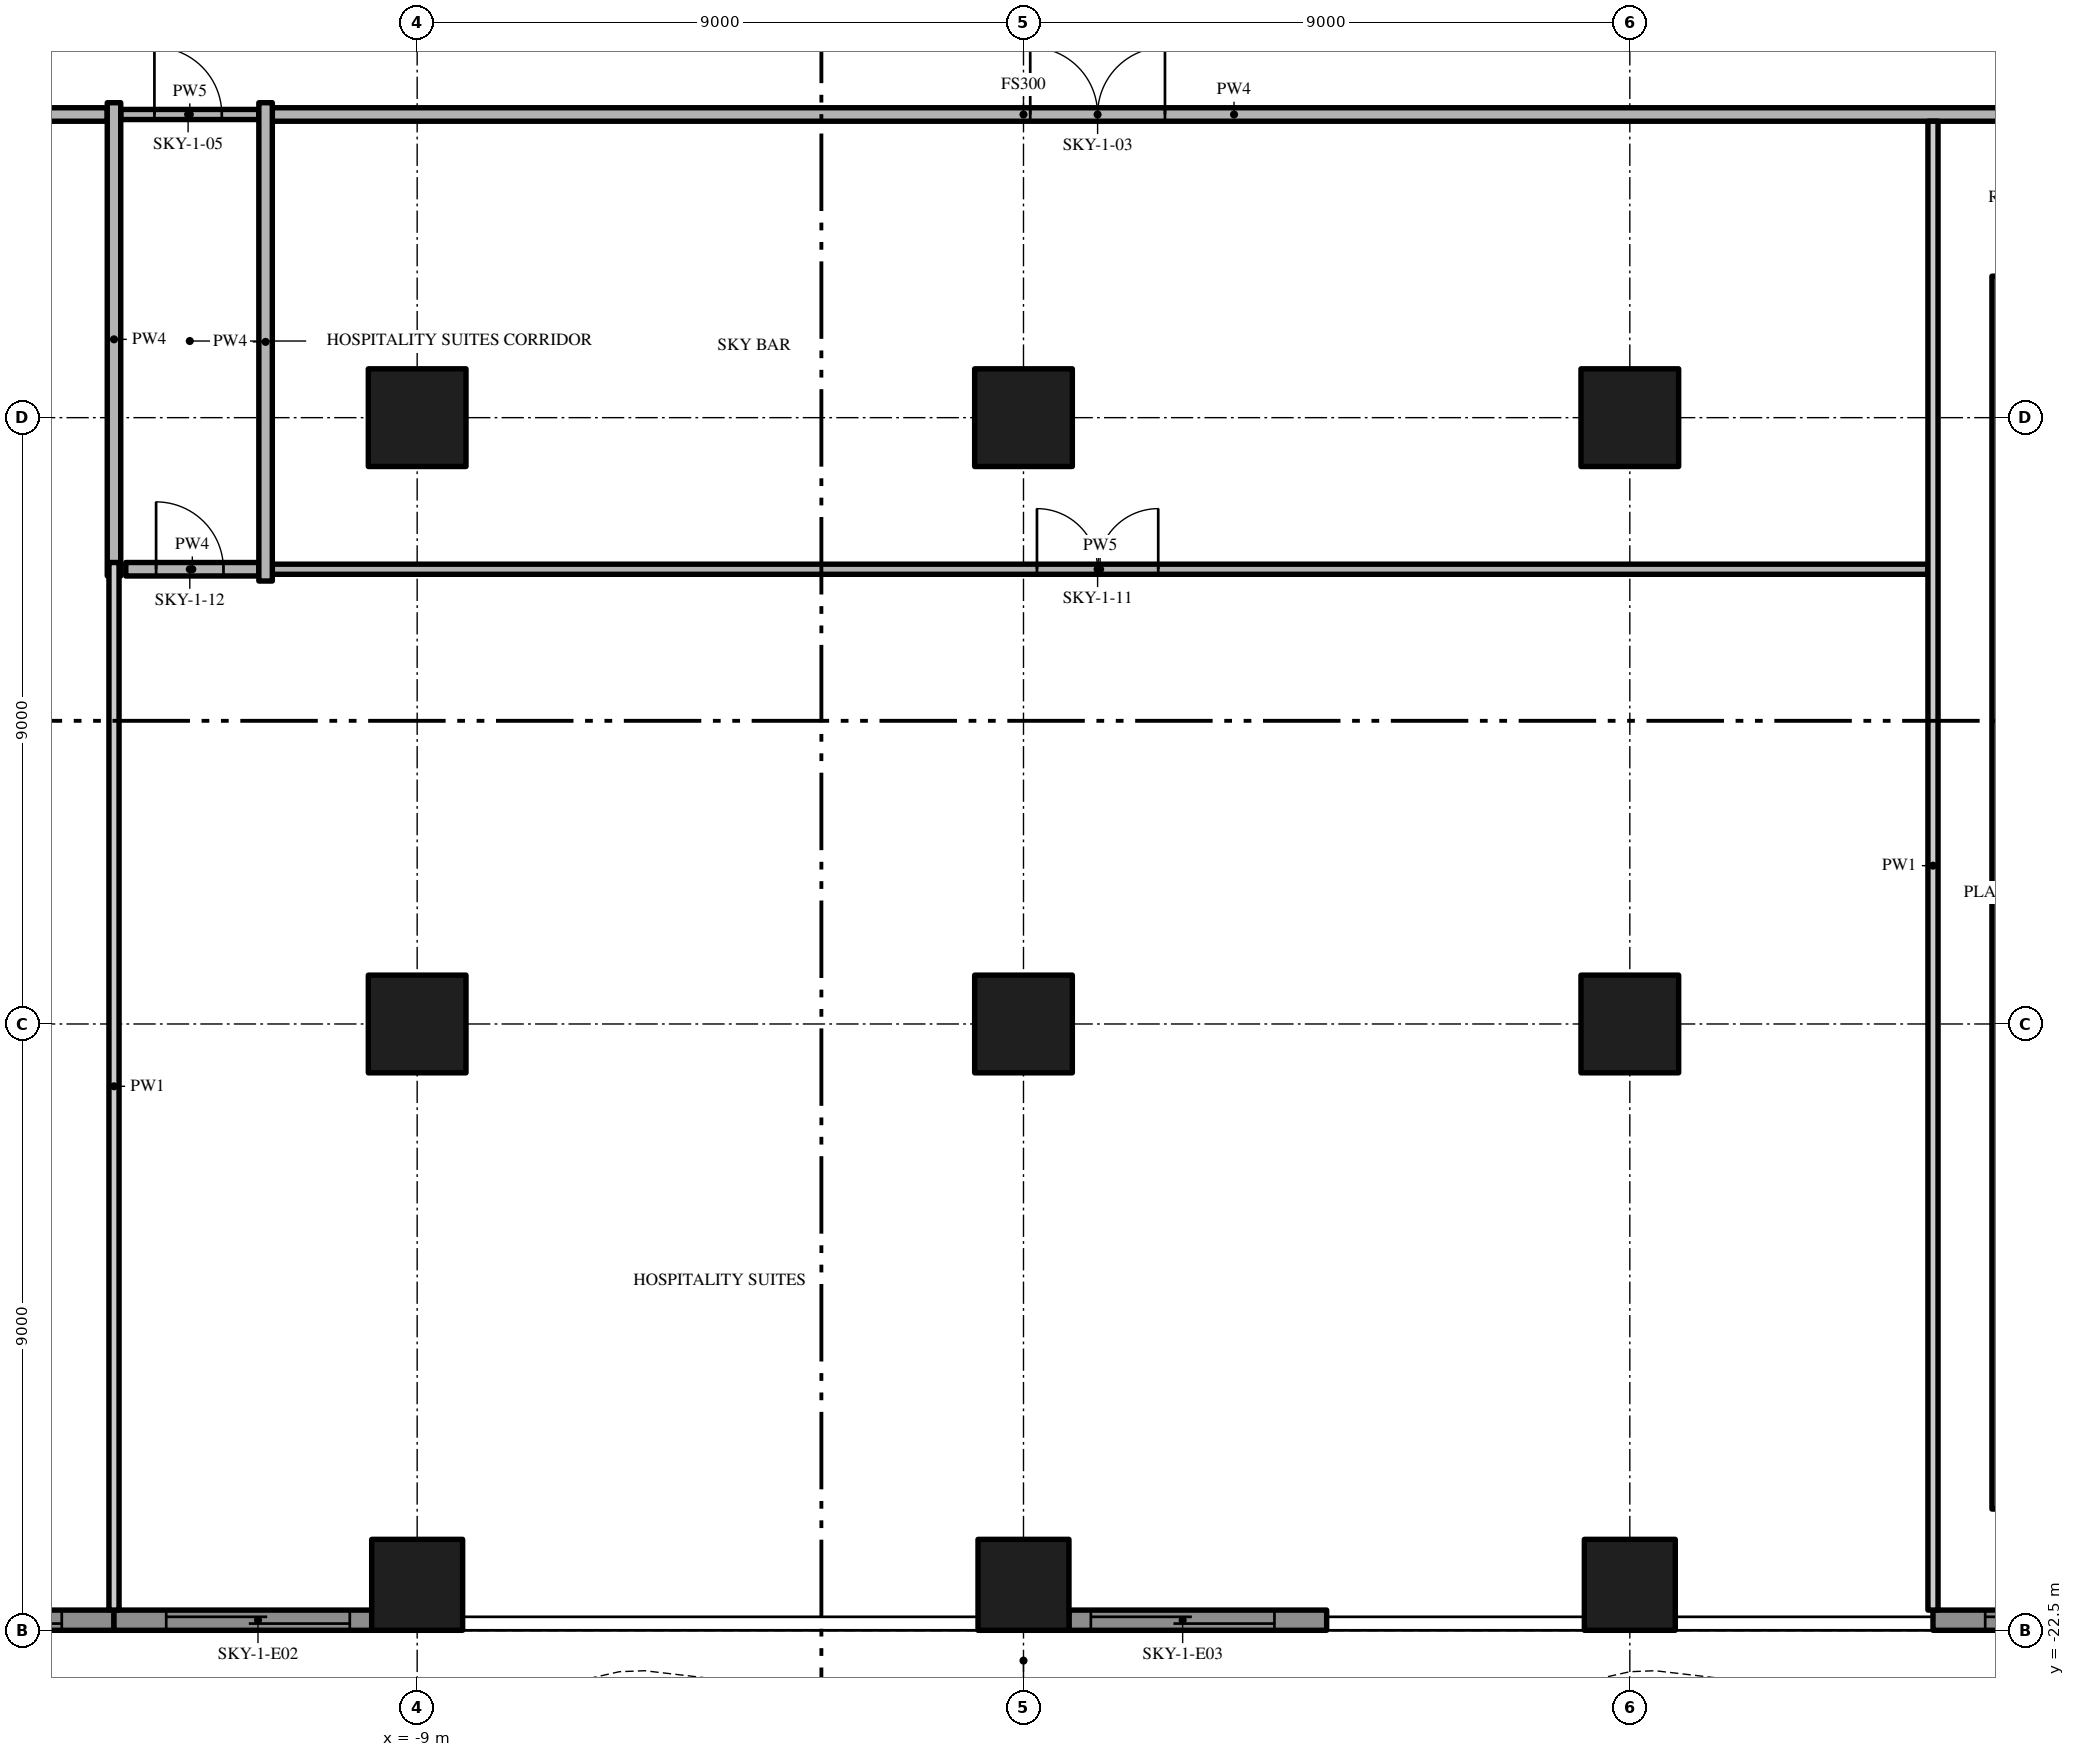
"""IFC4 building model, lengths in metres.
Left out: names, types, materials, properties, quantities, classifications, styles, units other than length and angle.
Written with IfcOpenShell. Run it as: python <this file> out.ifc"""

import sys

from ifc_helpers import new_model, si_unit, direction, frame, frame_2d, origin, origin_2d, place, context, subcontext, project, spatial, polyline, rectangle, outline, extrude, element, fill, save


model = new_model("IFC4")
c1 = context("Model", 3, precision=1e-05, world=origin(), true_north=direction((0.0, 1.0)))
c2 = subcontext(c1, "Body", "Model", "MODEL_VIEW")
j1 = project(units=[si_unit("LENGTHUNIT", "METRE"), si_unit("PLANEANGLEUNIT", "RADIAN")], contexts=[c1])
p1 = place(None, origin())
s1 = spatial("IfcSite", under=j1, at=p1, CompositionType="ELEMENT")
p2 = place(p1, origin())
s2 = spatial("IfcBuilding", under=s1, at=p2, CompositionType="ELEMENT")
p3 = place(p2, frame((0.0, 0.0, 64.4)))
s3 = spatial("IfcBuildingStorey", under=s2, at=p3, CompositionType="ELEMENT", Elevation=64.4)
p4 = place(p3, frame((-9.0, -13.5, 0.0), z_axis=(0.0, 0.0, 1.0), x_axis=(1.0, 0.0, 0.0)))
e1 = element("IfcColumn", 1, at=p4, inside=s3, PredefinedType="COLUMN", context=c2, shape_type="SweptSolid", body=[
    extrude(rectangle(XDim=1.45, YDim=1.45, at=origin_2d()), origin(), (0.0, 0.0, 1.0), 4.7),
])
p5 = place(p3, frame((-9.0, -21.825, 0.0), z_axis=(0.0, 0.0, 1.0), x_axis=(1.0, 0.0, 0.0)))
e2 = element("IfcColumn", 2, at=p5, inside=s3, PredefinedType="COLUMN", context=c2, shape_type="SweptSolid", body=[
    extrude(rectangle(XDim=1.35, YDim=1.35, at=origin_2d()), origin(), (0.0, 0.0, 1.0), 4.7),
])
for number, where, z_axis, x_axis in (
    (3, (-9.0, -4.5, 0.0), (0.0, 0.0, 1.0), (1.0, 0.0, 0.0)),
    (4, (0.0, -13.5, 0.0), (0.0, 0.0, 1.0), (1.0, 0.0, 0.0)),
):
    element("IfcColumn", number, at=place(p3, frame(where, z_axis=z_axis, x_axis=x_axis)), inside=s3, PredefinedType="COLUMN", context=c2, shape_type="SweptSolid", body=[
        extrude(rectangle(XDim=1.45, YDim=1.45, at=origin_2d()), origin(), (0.0, 0.0, 1.0), 4.7),
    ])
p6 = place(p3, frame((0.0, -21.825, 0.0), z_axis=(0.0, 0.0, 1.0), x_axis=(1.0, 0.0, 0.0)))
e5 = element("IfcColumn", 5, at=p6, inside=s3, PredefinedType="COLUMN", context=c2, shape_type="SweptSolid", body=[
    extrude(rectangle(XDim=1.35, YDim=1.35, at=origin_2d()), origin(), (0.0, 0.0, 1.0), 4.7),
])
for number, where, z_axis, x_axis in (
    (6, (0.0, -4.5, 0.0), (0.0, 0.0, 1.0), (1.0, 0.0, 0.0)),
    (7, (9.0, -13.5, 0.0), (0.0, 0.0, 1.0), (1.0, 0.0, 0.0)),
):
    element("IfcColumn", number, at=place(p3, frame(where, z_axis=z_axis, x_axis=x_axis)), inside=s3, PredefinedType="COLUMN", context=c2, shape_type="SweptSolid", body=[
        extrude(rectangle(XDim=1.45, YDim=1.45, at=origin_2d()), origin(), (0.0, 0.0, 1.0), 4.7),
    ])
p7 = place(p3, frame((9.0, -21.825, 0.0), z_axis=(0.0, 0.0, 1.0), x_axis=(1.0, 0.0, 0.0)))
e8 = element("IfcColumn", 8, at=p7, inside=s3, PredefinedType="COLUMN", context=c2, shape_type="SweptSolid", body=[
    extrude(rectangle(XDim=1.35, YDim=1.35, at=origin_2d()), origin(), (0.0, 0.0, 1.0), 4.7),
])
p8 = place(p3, frame((9.0, -4.5, 0.0), z_axis=(0.0, 0.0, 1.0), x_axis=(1.0, 0.0, 0.0)))
e9 = element("IfcColumn", 9, at=p8, inside=s3, PredefinedType="COLUMN", context=c2, shape_type="SweptSolid", body=[
    extrude(rectangle(XDim=1.45, YDim=1.45, at=origin_2d()), origin(), (0.0, 0.0, 1.0), 4.7),
])
p9 = place(p3, frame((-13.5, -22.35, 0.0), z_axis=(0.0, 0.0, 1.0), x_axis=(-1.0, 0.0, 0.0)))
e10 = element("IfcWall", 10, at=p9, inside=s3, PredefinedType="SOLIDWALL", context=c2, shape_type="SweptSolid", body=[
    extrude(rectangle(XDim=3.825, YDim=0.3, at=frame_2d((1.913, 0.0))), origin(), (0.0, 0.0, 1.0), 4.7),
])
p10 = place(p9, frame((0.775, 0.0, 0.0)))
e11 = element("IfcOpeningElement", 11, at=p10, cuts=e10, PredefinedType="OPENING", context=c2, shape_type="SweptSolid", body=[
    extrude(rectangle(XDim=2.725, YDim=2.4, at=frame_2d((1.363, 1.2))), frame((0.0, 0.16, 0.0), z_axis=(0.0, -1.0, 0.0), x_axis=(1.0, 0.0, 0.0)), (0.0, 0.0, 1.0), 0.32),
])
p11 = place(p3, frame((-9.675, -22.35, 0.0), z_axis=(0.0, 0.0, 1.0), x_axis=(-1.0, 0.0, 0.0)))
e12 = element("IfcWall", 12, at=p11, inside=s3, PredefinedType="SOLIDWALL", context=c2, shape_type="SweptSolid", body=[
    extrude(rectangle(XDim=3.825, YDim=0.3, at=frame_2d((1.913, 0.0))), origin(), (0.0, 0.0, 1.0), 4.7),
])
p12 = place(p11, frame((0.325, 0.0, 0.0)))
e13 = element("IfcOpeningElement", 13, at=p12, cuts=e12, PredefinedType="OPENING", context=c2, shape_type="SweptSolid", body=[
    extrude(rectangle(XDim=2.725, YDim=2.4, at=frame_2d((1.363, 1.2))), frame((0.0, 0.16, 0.0), z_axis=(0.0, -1.0, 0.0), x_axis=(1.0, 0.0, 0.0)), (0.0, 0.0, 1.0), 0.32),
])
p13 = place(p3, frame((4.5, -22.35, 0.0), z_axis=(0.0, 0.0, 1.0), x_axis=(-1.0, 0.0, 0.0)))
e14 = element("IfcWall", 14, at=p13, inside=s3, PredefinedType="SOLIDWALL", context=c2, shape_type="SweptSolid", body=[
    extrude(rectangle(XDim=3.825, YDim=0.3, at=frame_2d((1.913, 0.0))), origin(), (0.0, 0.0, 1.0), 4.7),
])
p14 = place(p13, frame((0.775, 0.0, 0.0)))
e15 = element("IfcOpeningElement", 15, at=p14, cuts=e14, PredefinedType="OPENING", context=c2, shape_type="SweptSolid", body=[
    extrude(rectangle(XDim=2.725, YDim=2.4, at=frame_2d((1.363, 1.2))), frame((0.0, 0.16, 0.0), z_axis=(0.0, -1.0, 0.0), x_axis=(1.0, 0.0, 0.0)), (0.0, 0.0, 1.0), 0.32),
])
p15 = place(p3, frame((17.325, -22.35, 0.0), z_axis=(0.0, 0.0, 1.0), x_axis=(-1.0, 0.0, 0.0)))
e16 = element("IfcWall", 16, at=p15, inside=s3, PredefinedType="SOLIDWALL", context=c2, shape_type="SweptSolid", body=[
    extrude(rectangle(XDim=3.825, YDim=0.3, at=frame_2d((1.913, 0.0))), origin(), (0.0, 0.0, 1.0), 4.7),
])
p16 = place(p15, frame((0.325, 0.0, 0.0)))
e17 = element("IfcOpeningElement", 17, at=p16, cuts=e16, PredefinedType="OPENING", context=c2, shape_type="SweptSolid", body=[
    extrude(rectangle(XDim=2.725, YDim=2.4, at=frame_2d((1.363, 1.2))), frame((0.0, 0.16, 0.0), z_axis=(0.0, -1.0, 0.0), x_axis=(1.0, 0.0, 0.0)), (0.0, 0.0, 1.0), 0.32),
])
p17 = place(p3, origin())
e18 = element("IfcWall", 18, at=p17, inside=s3, PredefinedType="USERDEFINED", context=c2, shape_type="SweptSolid", body=[
    extrude(outline(polyline([(-22.5, -23.451), (-21.0, -23.115), (-20.625, -23.1), (-19.5, -23.231), (-18.0, -23.755), (-16.5, -24.488), (-15.0, -25.149), (-13.5, -25.485), (-13.125, -25.5), (-12.0, -25.369), (-10.5, -24.845), (-9.0, -24.112), (-7.5, -23.451), (-6.0, -23.115), (-5.625, -23.1), (-4.5, -23.231), (-3.0, -23.755), (-1.5, -24.488), (0.0, -25.149), (1.5, -25.485), (1.875, -25.5), (3.0, -25.369), (4.5, -24.845), (6.0, -24.112), (7.5, -23.451), (9.0, -23.115), (9.375, -23.1), (10.5, -23.231), (12.0, -23.755), (13.5, -24.488), (15.0, -25.149), (16.5, -25.485), (16.875, -25.5), (18.0, -25.369), (19.5, -24.845), (21.0, -24.112), (22.5, -23.451), (22.399, -23.223), (20.895, -23.885), (19.404, -24.614), (17.944, -25.124), (16.865, -25.249), (16.533, -25.236), (15.079, -24.91), (13.605, -24.261), (12.096, -23.524), (10.556, -22.986), (9.385, -22.849), (8.967, -22.866), (7.421, -23.213), (5.895, -23.885), (4.404, -24.614), (2.944, -25.124), (1.865, -25.249), (1.533, -25.236), (0.079, -24.91), (-1.395, -24.261), (-2.904, -23.524), (-4.444, -22.986), (-5.615, -22.849), (-6.033, -22.866), (-7.579, -23.213), (-9.105, -23.885), (-10.596, -24.614), (-12.056, -25.124), (-13.135, -25.249), (-13.467, -25.236), (-14.921, -24.91), (-16.395, -24.261), (-17.904, -23.524), (-19.444, -22.986), (-20.615, -22.849), (-21.033, -22.866), (-22.555, -23.208), (-22.5, -23.451)])), origin(), (0.0, 0.0, 1.0), 0.9),
])
p18 = place(p3, frame((-13.325, -6.75, 0.0), z_axis=(0.0, 0.0, 1.0), x_axis=(1.0, 0.0, 0.0)))
e19 = element("IfcWall", 19, at=p18, inside=s3, PredefinedType="PARTITIONING", context=c2, shape_type="SweptSolid", body=[
    extrude(rectangle(XDim=1.975, YDim=0.2, at=frame_2d((0.988, 0.0))), origin(), (0.0, 0.0, 1.0), 4.7),
])
p19 = place(p18, frame((0.45, 0.0, 0.0)))
e20 = element("IfcOpeningElement", 20, at=p19, cuts=e19, PredefinedType="OPENING", context=c2, shape_type="SweptSolid", body=[
    extrude(rectangle(XDim=1.0, YDim=2.4, at=frame_2d((0.5, 1.2))), frame((0.0, 0.11, 0.0), z_axis=(0.0, -1.0, 0.0), x_axis=(1.0, 0.0, 0.0)), (0.0, 0.0, 1.0), 0.22),
])
p20 = place(p3, frame((-11.15, -6.75, 0.0), z_axis=(0.0, 0.0, 1.0), x_axis=(1.0, 0.0, 0.0)))
e21 = element("IfcWall", 21, at=p20, inside=s3, PredefinedType="PARTITIONING", context=c2, shape_type="SweptSolid", body=[
    extrude(rectangle(XDim=24.575, YDim=0.15, at=frame_2d((12.287, 0.0))), origin(), (0.0, 0.0, 1.0), 4.7),
])
p21 = place(p20, frame((11.35, 0.0, 0.0)))
e22 = element("IfcOpeningElement", 22, at=p21, cuts=e21, PredefinedType="OPENING", context=c2, shape_type="SweptSolid", body=[
    extrude(rectangle(XDim=1.8, YDim=2.4, at=frame_2d((0.9, 1.2))), frame((0.0, 0.085, 0.0), z_axis=(0.0, -1.0, 0.0), x_axis=(1.0, 0.0, 0.0)), (0.0, 0.0, 1.0), 0.17),
])
p22 = place(p3, frame((-17.4, 0.0, 0.0), z_axis=(0.0, 0.0, 1.0), x_axis=(1.0, 0.0, 0.0)))
e23 = element("IfcWall", 23, at=p22, inside=s3, PredefinedType="PARTITIONING", context=c2, shape_type="SweptSolid", body=[
    extrude(rectangle(XDim=3.8, YDim=0.2, at=frame_2d((1.9, 0.0))), origin(), (0.0, 0.0, 1.0), 4.7),
])
p23 = place(p22, frame((0.9, 0.0, 0.0)))
e24 = element("IfcOpeningElement", 24, at=p23, cuts=e23, PredefinedType="OPENING", context=c2, shape_type="SweptSolid", body=[
    extrude(rectangle(XDim=2.0, YDim=2.4, at=frame_2d((1.0, 1.2))), frame((0.0, 0.11, 0.0), z_axis=(0.0, -1.0, 0.0), x_axis=(1.0, 0.0, 0.0)), (0.0, 0.0, 1.0), 0.22),
])
p24 = place(p3, frame((-11.15, 0.0, 0.0), z_axis=(0.0, 0.0, 1.0), x_axis=(1.0, 0.0, 0.0)))
e25 = element("IfcWall", 25, at=p24, inside=s3, PredefinedType="PARTITIONING", context=c2, shape_type="SweptSolid", body=[
    extrude(rectangle(XDim=28.55, YDim=0.2, at=frame_2d((14.275, 0.0))), origin(), (0.0, 0.0, 1.0), 4.7),
])
p25 = place(p24, frame((11.25, 0.0, 0.0)))
e26 = element("IfcOpeningElement", 26, at=p25, cuts=e25, PredefinedType="OPENING", context=c2, shape_type="SweptSolid", body=[
    extrude(rectangle(XDim=2.0, YDim=2.4, at=frame_2d((1.0, 1.2))), frame((0.0, 0.11, 0.0), z_axis=(0.0, -1.0, 0.0), x_axis=(1.0, 0.0, 0.0)), (0.0, 0.0, 1.0), 0.22),
])
p26 = place(p24, frame((25.65, 0.0, 0.0)))
e27 = element("IfcOpeningElement", 27, at=p26, cuts=e25, PredefinedType="OPENING", context=c2, shape_type="SweptSolid", body=[
    extrude(rectangle(XDim=2.0, YDim=2.4, at=frame_2d((1.0, 1.2))), frame((0.0, 0.11, 0.0), z_axis=(0.0, -1.0, 0.0), x_axis=(1.0, 0.0, 0.0)), (0.0, 0.0, 1.0), 0.22),
])
p27 = place(p3, frame((-13.4, 0.0, 0.0), z_axis=(0.0, 0.0, 1.0), x_axis=(1.0, 0.0, 0.0)))
e28 = element("IfcWall", 28, at=p27, inside=s3, PredefinedType="PARTITIONING", context=c2, shape_type="SweptSolid", body=[
    extrude(rectangle(XDim=2.05, YDim=0.15, at=frame_2d((1.025, 0.0))), origin(), (0.0, 0.0, 1.0), 4.7),
])
p28 = place(p27, frame((0.5, 0.0, 0.0)))
e29 = element("IfcOpeningElement", 29, at=p28, cuts=e28, PredefinedType="OPENING", context=c2, shape_type="SweptSolid", body=[
    extrude(rectangle(XDim=1.0, YDim=2.4, at=frame_2d((0.5, 1.2))), frame((0.0, 0.085, 0.0), z_axis=(0.0, -1.0, 0.0), x_axis=(1.0, 0.0, 0.0)), (0.0, 0.0, 1.0), 0.17),
])
p29 = place(p3, frame((-13.5, -6.85, 0.0), z_axis=(0.0, 0.0, 1.0), x_axis=(0.0, 1.0, 0.0)))
e30 = element("IfcWall", 30, at=p29, inside=s3, PredefinedType="PARTITIONING", context=c2, shape_type="SweptSolid", body=[
    extrude(rectangle(XDim=7.025, YDim=0.2, at=frame_2d((3.513, 0.0))), origin(), (0.0, 0.0, 1.0), 4.7),
])
p30 = place(p3, frame((-13.5, -22.2, 0.0), z_axis=(0.0, 0.0, 1.0), x_axis=(0.0, 1.0, 0.0)))
e31 = element("IfcWall", 31, at=p30, inside=s3, PredefinedType="PARTITIONING", context=c2, shape_type="SweptSolid", body=[
    extrude(rectangle(XDim=15.55, YDim=0.15, at=frame_2d((7.775, 0.0))), origin(), (0.0, 0.0, 1.0), 4.7),
])
p31 = place(p3, frame((-11.25, -6.925, 0.0), z_axis=(0.0, 0.0, 1.0), x_axis=(0.0, 1.0, 0.0)))
e32 = element("IfcWall", 32, at=p31, inside=s3, PredefinedType="PARTITIONING", context=c2, shape_type="SweptSolid", body=[
    extrude(rectangle(XDim=7.1, YDim=0.2, at=frame_2d((3.55, 0.0))), origin(), (0.0, 0.0, 1.0), 4.7),
])
p32 = place(p3, frame((13.5, -22.2, 0.0), z_axis=(0.0, 0.0, 1.0), x_axis=(0.0, 1.0, 0.0)))
e33 = element("IfcWall", 33, at=p32, inside=s3, PredefinedType="PARTITIONING", context=c2, shape_type="SweptSolid", body=[
    extrude(rectangle(XDim=22.1, YDim=0.15, at=frame_2d((11.05, 0.0))), origin(), (0.0, 0.0, 1.0), 4.7),
])
p33 = place(p3, origin())
e34 = element("IfcWall", 34, at=p33, inside=s3, PredefinedType="USERDEFINED", context=c2, shape_type="SweptSolid", body=[
    extrude(outline(polyline([(16.775, -20.7), (16.775, -2.4), (14.375, -2.4), (14.375, -20.7), (16.775, -20.7)]), holes=[polyline([(14.625, -20.45), (14.625, -2.65), (16.525, -2.65), (16.525, -20.45), (14.625, -20.45)])]), origin(), (0.0, 0.0, 1.0), 0.9),
])
p34 = place(p10, origin())
e35 = element("IfcDoor", 35, at=p34, inside=s3, OperationType="SINGLE_SWING_LEFT", PredefinedType="DOOR", context=c2, shape_type="SweptSolid", body=[
    extrude(rectangle(XDim=2.725, YDim=2.4, at=frame_2d((1.363, 1.2))), frame((0.0, 0.025, 0.0), z_axis=(0.0, -1.0, 0.0), x_axis=(1.0, 0.0, 0.0)), (0.0, 0.0, 1.0), 0.05),
])
fill(e11, e35)
p35 = place(p12, origin())
e36 = element("IfcDoor", 36, at=p35, inside=s3, OperationType="SINGLE_SWING_LEFT", PredefinedType="DOOR", context=c2, shape_type="SweptSolid", body=[
    extrude(rectangle(XDim=2.725, YDim=2.4, at=frame_2d((1.363, 1.2))), frame((0.0, 0.025, 0.0), z_axis=(0.0, -1.0, 0.0), x_axis=(1.0, 0.0, 0.0)), (0.0, 0.0, 1.0), 0.05),
])
fill(e13, e36)
p36 = place(p14, origin())
e37 = element("IfcDoor", 37, at=p36, inside=s3, OperationType="SINGLE_SWING_LEFT", PredefinedType="DOOR", context=c2, shape_type="SweptSolid", body=[
    extrude(rectangle(XDim=2.725, YDim=2.4, at=frame_2d((1.363, 1.2))), frame((0.0, 0.025, 0.0), z_axis=(0.0, -1.0, 0.0), x_axis=(1.0, 0.0, 0.0)), (0.0, 0.0, 1.0), 0.05),
])
fill(e15, e37)
p37 = place(p16, origin())
e38 = element("IfcDoor", 38, at=p37, inside=s3, OperationType="SINGLE_SWING_LEFT", PredefinedType="DOOR", context=c2, shape_type="SweptSolid", body=[
    extrude(rectangle(XDim=2.725, YDim=2.4, at=frame_2d((1.363, 1.2))), frame((0.0, 0.025, 0.0), z_axis=(0.0, -1.0, 0.0), x_axis=(1.0, 0.0, 0.0)), (0.0, 0.0, 1.0), 0.05),
])
fill(e17, e38)
p38 = place(p25, origin())
e39 = element("IfcDoor", 39, at=p38, inside=s3, OperationType="DOUBLE_DOOR_SINGLE_SWING", PredefinedType="DOOR", context=c2, shape_type="SweptSolid", body=[
    extrude(rectangle(XDim=2.0, YDim=2.4, at=frame_2d((1.0, 1.2))), frame((0.0, 0.025, 0.0), z_axis=(0.0, -1.0, 0.0), x_axis=(1.0, 0.0, 0.0)), (0.0, 0.0, 1.0), 0.05),
])
fill(e26, e39)
p39 = place(p28, origin())
e40 = element("IfcDoor", 40, at=p39, inside=s3, OperationType="SINGLE_SWING_LEFT", PredefinedType="DOOR", context=c2, shape_type="SweptSolid", body=[
    extrude(rectangle(XDim=1.0, YDim=2.4, at=frame_2d((0.5, 1.2))), frame((0.0, 0.025, 0.0), z_axis=(0.0, -1.0, 0.0), x_axis=(1.0, 0.0, 0.0)), (0.0, 0.0, 1.0), 0.05),
])
fill(e29, e40)
p40 = place(p21, origin())
e41 = element("IfcDoor", 41, at=p40, inside=s3, OperationType="DOUBLE_DOOR_SINGLE_SWING", PredefinedType="DOOR", context=c2, shape_type="SweptSolid", body=[
    extrude(rectangle(XDim=1.8, YDim=2.4, at=frame_2d((0.9, 1.2))), frame((0.0, 0.025, 0.0), z_axis=(0.0, -1.0, 0.0), x_axis=(1.0, 0.0, 0.0)), (0.0, 0.0, 1.0), 0.05),
])
fill(e22, e41)
p41 = place(p19, origin())
e42 = element("IfcDoor", 42, at=p41, inside=s3, OperationType="SINGLE_SWING_LEFT", PredefinedType="DOOR", context=c2, shape_type="SweptSolid", body=[
    extrude(rectangle(XDim=1.0, YDim=2.4, at=frame_2d((0.5, 1.2))), frame((0.0, 0.025, 0.0), z_axis=(0.0, -1.0, 0.0), x_axis=(1.0, 0.0, 0.0)), (0.0, 0.0, 1.0), 0.05),
])
fill(e20, e42)
save(model, sys.argv[1])
